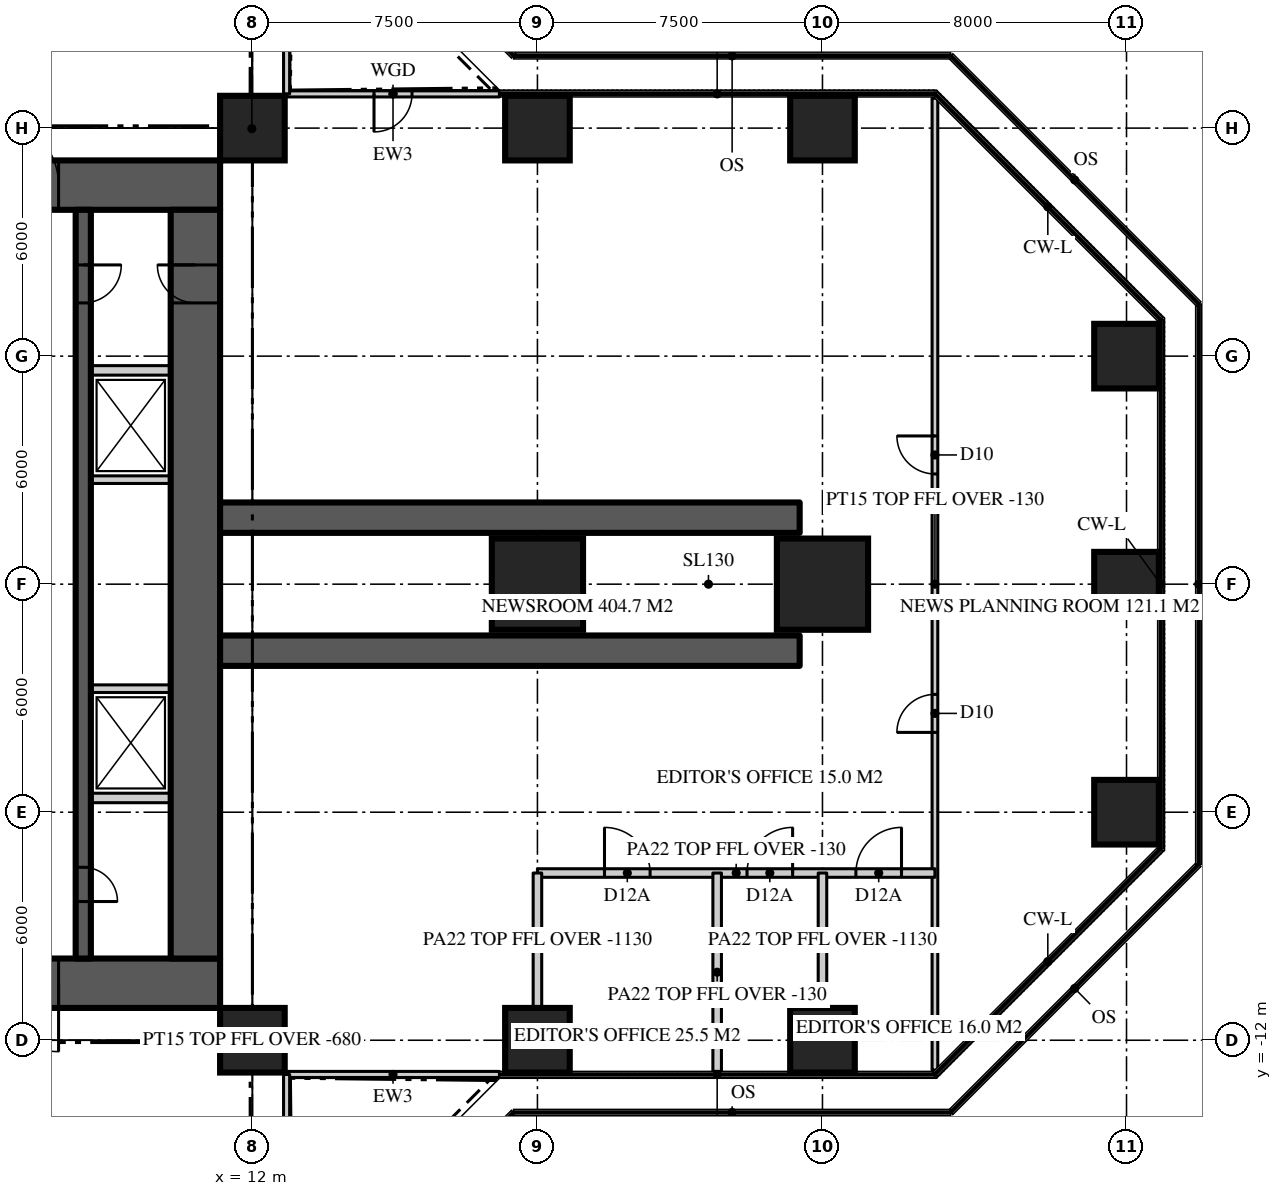
"""IFC4 building model, lengths in metres.
Left out: names, types, materials, properties, quantities, classifications, styles, units other than length and angle.
Written with IfcOpenShell. Run it as: python <this file> out.ifc"""

import sys

from ifc_helpers import new_model, si_unit, direction, frame, frame_2d, origin, origin_2d, place, context, subcontext, project, spatial, rectangle, extrude, element, fill, save


model = new_model("IFC4")
c1 = context("Model", 3, precision=1e-05, world=origin(), true_north=direction((0.0, 1.0)))
c2 = subcontext(c1, "Body", "Model", "MODEL_VIEW")
j1 = project(units=[si_unit("LENGTHUNIT", "METRE"), si_unit("PLANEANGLEUNIT", "RADIAN")], contexts=[c1])
p1 = place(None, origin())
s1 = spatial("IfcSite", under=j1, at=p1, CompositionType="ELEMENT")
p2 = place(p1, origin())
s2 = spatial("IfcBuilding", under=s1, at=p2, CompositionType="ELEMENT")
p3 = place(p2, frame((0.0, 0.0, 47.4)))
s3 = spatial("IfcBuildingStorey", under=s2, at=p3, CompositionType="ELEMENT", Elevation=47.4)
p4 = place(p3, frame((-11.15, 10.5, 0.0), z_axis=(0.0, 0.0, 1.0), x_axis=(1.0, 0.0, 0.0)))
e1 = element("IfcWall", 1, at=p4, inside=s3, PredefinedType="SHEAR", context=c2, shape_type="SweptSolid", body=[
    extrude(rectangle(XDim=22.3, YDim=1.3, at=frame_2d((11.15, 0.0))), origin(), (0.0, 0.0, 1.0), 3.9),
])
p5 = place(p4, frame((4.25, 0.0, 0.0)))
e2 = element("IfcOpeningElement", 2, at=p5, cuts=e1, PredefinedType="OPENING", context=c2, shape_type="SweptSolid", body=[
    extrude(rectangle(XDim=1.8, YDim=2.2, at=frame_2d((0.9, 1.1))), frame((0.0, 0.66, 0.0), z_axis=(0.0, -1.0, 0.0), x_axis=(1.0, 0.0, 0.0)), (0.0, 0.0, 1.0), 1.32),
])
p6 = place(p4, frame((16.25, 0.0, 0.0)))
e3 = element("IfcOpeningElement", 3, at=p6, cuts=e1, PredefinedType="OPENING", context=c2, shape_type="SweptSolid", body=[
    extrude(rectangle(XDim=1.8, YDim=2.2, at=frame_2d((0.9, 1.1))), frame((0.0, 0.66, 0.0), z_axis=(0.0, -1.0, 0.0), x_axis=(1.0, 0.0, 0.0)), (0.0, 0.0, 1.0), 1.32),
])
p7 = place(p3, frame((11.15, -10.5, 0.0), z_axis=(0.0, 0.0, 1.0), x_axis=(-1.0, 0.0, 0.0)))
e4 = element("IfcWall", 4, at=p7, inside=s3, PredefinedType="SHEAR", context=c2, shape_type="SweptSolid", body=[
    extrude(rectangle(XDim=22.3, YDim=1.3, at=frame_2d((11.15, 0.0))), origin(), (0.0, 0.0, 1.0), 3.9),
])
p8 = place(p7, frame((16.25, 0.0, 0.0)))
e5 = element("IfcOpeningElement", 5, at=p8, cuts=e4, PredefinedType="OPENING", context=c2, shape_type="SweptSolid", body=[
    extrude(rectangle(XDim=1.8, YDim=2.2, at=frame_2d((0.9, 1.1))), frame((0.0, 0.66, 0.0), z_axis=(0.0, -1.0, 0.0), x_axis=(1.0, 0.0, 0.0)), (0.0, 0.0, 1.0), 1.32),
])
p9 = place(p7, frame((4.25, 0.0, 0.0)))
e6 = element("IfcOpeningElement", 6, at=p9, cuts=e4, PredefinedType="OPENING", context=c2, shape_type="SweptSolid", body=[
    extrude(rectangle(XDim=1.8, YDim=2.2, at=frame_2d((0.9, 1.1))), frame((0.0, 0.66, 0.0), z_axis=(0.0, -1.0, 0.0), x_axis=(1.0, 0.0, 0.0)), (0.0, 0.0, 1.0), 1.32),
])
p10 = place(p3, frame((10.5, -9.85, 0.0), z_axis=(0.0, 0.0, 1.0), x_axis=(0.0, 1.0, 0.0)))
e7 = element("IfcWall", 7, at=p10, inside=s3, PredefinedType="SHEAR", context=c2, shape_type="SweptSolid", body=[
    extrude(rectangle(XDim=19.7, YDim=1.3, at=frame_2d((9.85, 0.0))), origin(), (0.0, 0.0, 1.0), 3.9),
])
p11 = place(p10, frame((17.25, 0.0, 0.0)))
e8 = element("IfcOpeningElement", 8, at=p11, cuts=e7, PredefinedType="OPENING", context=c2, shape_type="SweptSolid", body=[
    extrude(rectangle(XDim=1.0, YDim=2.2, at=frame_2d((0.5, 1.1))), frame((0.0, 0.66, 0.0), z_axis=(0.0, -1.0, 0.0), x_axis=(1.0, 0.0, 0.0)), (0.0, 0.0, 1.0), 1.32),
])
for number, where, z_axis, x_axis in (
    (9, (11.15, -1.75, 0.0), (0.0, 0.0, 1.0), (1.0, 0.0, 0.0)),
    (10, (11.15, 1.75, 0.0), (0.0, 0.0, 1.0), (1.0, 0.0, 0.0)),
):
    element("IfcWall", number, at=place(p3, frame(where, z_axis=z_axis, x_axis=x_axis)), inside=s3, PredefinedType="SHEAR", context=c2, shape_type="SweptSolid", body=[
        extrude(rectangle(XDim=15.25, YDim=0.8, at=frame_2d((7.625, 0.0))), origin(), (0.0, 0.0, 1.0), 3.9),
    ])
for number, where, z_axis, x_axis in (
    (11, (12.0, -12.0, 0.0), (0.0, 0.0, 1.0), (1.0, 0.0, 0.0)),
    (12, (19.5, -12.0, 0.0), (0.0, 0.0, 1.0), (1.0, 0.0, 0.0)),
    (13, (27.0, -12.0, 0.0), (0.0, 0.0, 1.0), (1.0, 0.0, 0.0)),
    (14, (35.0, -6.0, 0.0), (0.0, 0.0, 1.0), (1.0, 0.0, 0.0)),
):
    element("IfcColumn", number, at=place(p3, frame(where, z_axis=z_axis, x_axis=x_axis)), inside=s3, PredefinedType="COLUMN", context=c2, shape_type="SweptSolid", body=[
        extrude(rectangle(XDim=1.7, YDim=1.7, at=origin_2d()), origin(), (0.0, 0.0, 1.0), 3.9),
    ])
for number, where, z_axis, x_axis in (
    (15, (19.5, 0.0, 0.0), (0.0, 0.0, 1.0), (1.0, 0.0, 0.0)),
    (16, (27.0, 0.0, 0.0), (0.0, 0.0, 1.0), (1.0, 0.0, 0.0)),
):
    element("IfcColumn", number, at=place(p3, frame(where, z_axis=z_axis, x_axis=x_axis)), inside=s3, PredefinedType="COLUMN", context=c2, shape_type="SweptSolid", body=[
        extrude(rectangle(XDim=2.4, YDim=2.4, at=origin_2d()), origin(), (0.0, 0.0, 1.0), 3.9),
    ])
for number, where, z_axis, x_axis in (
    (17, (35.0, 0.0, 0.0), (0.0, 0.0, 1.0), (1.0, 0.0, 0.0)),
    (18, (35.0, 6.0, 0.0), (0.0, 0.0, 1.0), (1.0, 0.0, 0.0)),
    (19, (12.0, 12.0, 0.0), (0.0, 0.0, 1.0), (1.0, 0.0, 0.0)),
    (20, (19.5, 12.0, 0.0), (0.0, 0.0, 1.0), (1.0, 0.0, 0.0)),
    (21, (27.0, 12.0, 0.0), (0.0, 0.0, 1.0), (1.0, 0.0, 0.0)),
):
    element("IfcColumn", number, at=place(p3, frame(where, z_axis=z_axis, x_axis=x_axis)), inside=s3, PredefinedType="COLUMN", context=c2, shape_type="SweptSolid", body=[
        extrude(rectangle(XDim=1.7, YDim=1.7, at=origin_2d()), origin(), (0.0, 0.0, 1.0), 3.9),
    ])
p12 = place(p3, frame((12.9, -12.9, 0.0), z_axis=(0.0, 0.0, 1.0), x_axis=(1.0, 0.0, 0.0)))
e22 = element("IfcWall", 22, at=p12, inside=s3, PredefinedType="SOLIDWALL", context=c2, shape_type="SweptSolid", body=[
    extrude(rectangle(XDim=5.6, YDim=0.16, at=frame_2d((2.8, 0.0))), origin(), (0.0, 0.0, 1.0), 3.77),
])
p13 = place(p3, frame((18.5, 12.9, 0.0), z_axis=(0.0, 0.0, 1.0), x_axis=(-1.0, 0.0, 0.0)))
e23 = element("IfcWall", 23, at=p13, inside=s3, PredefinedType="SOLIDWALL", context=c2, shape_type="SweptSolid", body=[
    extrude(rectangle(XDim=5.6, YDim=0.16, at=frame_2d((2.8, 0.0))), origin(), (0.0, 0.0, 1.0), 3.77),
])
p14 = place(p13, frame((2.3, 0.0, 0.0)))
e24 = element("IfcOpeningElement", 24, at=p14, cuts=e23, PredefinedType="OPENING", context=c2, shape_type="SweptSolid", body=[
    extrude(rectangle(XDim=1.0, YDim=2.2, at=frame_2d((0.5, 1.1))), frame((0.0, 0.09, 0.0), z_axis=(0.0, -1.0, 0.0), x_axis=(1.0, 0.0, 0.0)), (0.0, 0.0, 1.0), 0.18),
])
p15 = place(p3, frame((12.9, 12.9, 0.0), z_axis=(0.0, 0.0, 1.0), x_axis=(0.0, 1.0, 0.0)))
e25 = element("IfcWall", 25, at=p15, inside=s3, PredefinedType="SOLIDWALL", context=c2, shape_type="SweptSolid", body=[
    extrude(rectangle(XDim=5.6, YDim=0.16, at=frame_2d((2.8, 0.0))), origin(), (0.0, 0.0, 1.0), 3.77),
])
p16 = place(p3, frame((12.9, -18.5, 0.0), z_axis=(0.0, 0.0, 1.0), x_axis=(0.0, 1.0, 0.0)))
e26 = element("IfcWall", 26, at=p16, inside=s3, PredefinedType="SOLIDWALL", context=c2, shape_type="SweptSolid", body=[
    extrude(rectangle(XDim=5.6, YDim=0.16, at=frame_2d((2.8, 0.0))), origin(), (0.0, 0.0, 1.0), 3.77),
])
p17 = place(p16, frame((2.3, 0.0, 0.0)))
e27 = element("IfcOpeningElement", 27, at=p17, cuts=e26, PredefinedType="OPENING", context=c2, shape_type="SweptSolid", body=[
    extrude(rectangle(XDim=1.0, YDim=2.2, at=frame_2d((0.5, 1.1))), frame((0.0, 0.09, 0.0), z_axis=(0.0, -1.0, 0.0), x_axis=(1.0, 0.0, 0.0)), (0.0, 0.0, 1.0), 0.18),
])
p18 = place(p3, frame((7.55, 9.85, 0.0), z_axis=(0.0, 0.0, 1.0), x_axis=(0.0, -1.0, 0.0)))
e28 = element("IfcWall", 28, at=p18, inside=s3, PredefinedType="SHEAR", context=c2, shape_type="SweptSolid", body=[
    extrude(rectangle(XDim=19.7, YDim=0.4, at=frame_2d((9.85, 0.0))), origin(), (0.0, 0.0, 1.0), 3.9),
])
p19 = place(p18, frame((1.45, 0.0, 0.0)))
e29 = element("IfcOpeningElement", 29, at=p19, cuts=e28, PredefinedType="OPENING", context=c2, shape_type="SweptSolid", body=[
    extrude(rectangle(XDim=1.0, YDim=2.2, at=frame_2d((0.5, 1.1))), frame((0.0, 0.21, 0.0), z_axis=(0.0, -1.0, 0.0), x_axis=(1.0, 0.0, 0.0)), (0.0, 0.0, 1.0), 0.42),
])
p20 = place(p18, frame((17.3, 0.0, 0.0)))
e30 = element("IfcOpeningElement", 30, at=p20, cuts=e28, PredefinedType="OPENING", context=c2, shape_type="SweptSolid", body=[
    extrude(rectangle(XDim=0.9, YDim=2.1, at=frame_2d((0.45, 1.05))), frame((0.0, 0.21, 0.0), z_axis=(0.0, -1.0, 0.0), x_axis=(1.0, 0.0, 0.0)), (0.0, 0.0, 1.0), 0.42),
])
for number, where, z_axis, x_axis in (
    (31, (7.75, 5.625, 0.0), (0.0, 0.0, 1.0), (1.0, 0.0, 0.0)),
    (32, (7.75, -5.625, 0.0), (0.0, 0.0, 1.0), (1.0, 0.0, 0.0)),
):
    element("IfcWall", number, at=place(p3, frame(where, z_axis=z_axis, x_axis=x_axis)), inside=s3, PredefinedType="SOLIDWALL", context=c2, shape_type="SweptSolid", body=[
        extrude(rectangle(XDim=2.1, YDim=0.25, at=frame_2d((1.05, 0.0))), origin(), (0.0, 0.0, 1.0), 3.7),
    ])
for number, where, z_axis, x_axis in (
    (33, (7.75, -2.75, 0.0), (0.0, 0.0, 1.0), (1.0, 0.0, 0.0)),
    (34, (7.75, 2.75, 0.0), (0.0, 0.0, 1.0), (1.0, 0.0, 0.0)),
):
    element("IfcWall", number, at=place(p3, frame(where, z_axis=z_axis, x_axis=x_axis)), inside=s3, PredefinedType="SOLIDWALL", context=c2, shape_type="SweptSolid", body=[
        extrude(rectangle(XDim=2.1, YDim=0.2, at=frame_2d((1.05, 0.0))), origin(), (0.0, 0.0, 1.0), 3.7),
    ])
p21 = place(p3, frame((29.959, -12.786, 0.0), z_axis=(0.0, 0.0, 1.0), x_axis=(0.0, 1.0, 0.0)))
e35 = element("IfcWall", 35, at=p21, inside=s3, PredefinedType="PARTITIONING", context=c2, shape_type="SweptSolid", body=[
    extrude(rectangle(XDim=25.573, YDim=0.15, at=frame_2d((12.786, 0.0))), origin(), (0.0, 0.0, 1.0), 3.77),
])
p22 = place(p21, frame((15.687, 0.0, 0.0)))
e36 = element("IfcOpeningElement", 36, at=p22, cuts=e35, PredefinedType="OPENING", context=c2, shape_type="SweptSolid", body=[
    extrude(rectangle(XDim=1.0, YDim=2.2, at=frame_2d((0.5, 1.1))), frame((0.0, 0.085, 0.0), z_axis=(0.0, -1.0, 0.0), x_axis=(1.0, 0.0, 0.0)), (0.0, 0.0, 1.0), 0.17),
])
p23 = place(p21, frame((8.886, 0.0, 0.0)))
e37 = element("IfcOpeningElement", 37, at=p23, cuts=e35, PredefinedType="OPENING", context=c2, shape_type="SweptSolid", body=[
    extrude(rectangle(XDim=1.0, YDim=2.2, at=frame_2d((0.5, 1.1))), frame((0.0, 0.085, 0.0), z_axis=(0.0, -1.0, 0.0), x_axis=(1.0, 0.0, 0.0)), (0.0, 0.0, 1.0), 0.17),
])
p24 = place(p3, frame((19.5, -7.6, 0.0), z_axis=(0.0, 0.0, 1.0), x_axis=(1.0, 0.0, 0.0)))
e38 = element("IfcWall", 38, at=p24, inside=s3, PredefinedType="PARTITIONING", context=c2, shape_type="SweptSolid", body=[
    extrude(rectangle(XDim=10.459, YDim=0.225, at=frame_2d((5.229, 0.0))), origin(), (0.0, 0.0, 1.0), 3.77),
])
p25 = place(p24, frame((1.764, 0.0, 0.0)))
e39 = element("IfcOpeningElement", 39, at=p25, cuts=e38, PredefinedType="OPENING", context=c2, shape_type="SweptSolid", body=[
    extrude(rectangle(XDim=1.2, YDim=2.2, at=frame_2d((0.6, 1.1))), frame((0.0, 0.123, 0.0), z_axis=(0.0, -1.0, 0.0), x_axis=(1.0, 0.0, 0.0)), (0.0, 0.0, 1.0), 0.245),
])
p26 = place(p24, frame((5.514, 0.0, 0.0)))
e40 = element("IfcOpeningElement", 40, at=p26, cuts=e38, PredefinedType="OPENING", context=c2, shape_type="SweptSolid", body=[
    extrude(rectangle(XDim=1.2, YDim=2.2, at=frame_2d((0.6, 1.1))), frame((0.0, 0.123, 0.0), z_axis=(0.0, -1.0, 0.0), x_axis=(1.0, 0.0, 0.0)), (0.0, 0.0, 1.0), 0.245),
])
p27 = place(p24, frame((8.379, 0.0, 0.0)))
e41 = element("IfcOpeningElement", 41, at=p27, cuts=e38, PredefinedType="OPENING", context=c2, shape_type="SweptSolid", body=[
    extrude(rectangle(XDim=1.2, YDim=2.2, at=frame_2d((0.6, 1.1))), frame((0.0, 0.123, 0.0), z_axis=(0.0, -1.0, 0.0), x_axis=(1.0, 0.0, 0.0)), (0.0, 0.0, 1.0), 0.245),
])
p28 = place(p3, frame((19.5, -7.6, 0.0), z_axis=(0.0, 0.0, 1.0), x_axis=(0.0, -1.0, 0.0)))
e42 = element("IfcWall", 42, at=p28, inside=s3, PredefinedType="PARTITIONING", context=c2, shape_type="SweptSolid", body=[
    extrude(rectangle(XDim=3.55, YDim=0.225, at=frame_2d((1.775, 0.0))), origin(), (0.0, 0.0, 1.0), 2.77),
])
p29 = place(p3, frame((24.229, -7.6, 0.0), z_axis=(0.0, 0.0, 1.0), x_axis=(0.0, -1.0, 0.0)))
e43 = element("IfcWall", 43, at=p29, inside=s3, PredefinedType="PARTITIONING", context=c2, shape_type="SweptSolid", body=[
    extrude(rectangle(XDim=5.22, YDim=0.225, at=frame_2d((2.61, 0.0))), origin(), (0.0, 0.0, 1.0), 3.77),
])
p30 = place(p3, frame((27.0, -7.6, 0.0), z_axis=(0.0, 0.0, 1.0), x_axis=(0.0, -1.0, 0.0)))
e44 = element("IfcWall", 44, at=p30, inside=s3, PredefinedType="PARTITIONING", context=c2, shape_type="SweptSolid", body=[
    extrude(rectangle(XDim=3.55, YDim=0.225, at=frame_2d((1.775, 0.0))), origin(), (0.0, 0.0, 1.0), 2.77),
])
for number, where, z_axis, x_axis in (
    (45, (11.15, 11.15, 0.0), (0.0, 0.0, 1.0), (0.707, 0.707, 0.0)),
    (46, (11.15, -11.15, 0.0), (0.0, 0.0, 1.0), (0.707, -0.707, 0.0)),
):
    element("IfcWall", number, at=place(p3, frame(where, z_axis=z_axis, x_axis=x_axis)), inside=s3, PredefinedType="PARTITIONING", context=c2, shape_type="SweptSolid", body=[
        extrude(rectangle(XDim=2.362, YDim=0.15, at=frame_2d((1.181, 0.0))), origin(), (0.0, 0.0, 1.0), 3.22),
    ])
p31 = place(p14, origin())
e47 = element("IfcDoor", 47, at=p31, inside=s3, OperationType="SINGLE_SWING_RIGHT", PredefinedType="DOOR", context=c2, shape_type="SweptSolid", body=[
    extrude(rectangle(XDim=1.0, YDim=2.2, at=frame_2d((0.5, 1.1))), frame((0.0, 0.025, 0.0), z_axis=(0.0, -1.0, 0.0), x_axis=(1.0, 0.0, 0.0)), (0.0, 0.0, 1.0), 0.05),
])
fill(e24, e47)
p32 = place(p6, origin())
e48 = element("IfcDoor", 48, at=p32, inside=s3, OperationType="DOUBLE_DOOR_DOUBLE_SWING", PredefinedType="DOOR", context=c2, shape_type="SweptSolid", body=[
    extrude(rectangle(XDim=1.8, YDim=2.2, at=frame_2d((0.9, 1.1))), frame((0.0, 0.025, 0.0), z_axis=(0.0, -1.0, 0.0), x_axis=(1.0, 0.0, 0.0)), (0.0, 0.0, 1.0), 0.05),
])
fill(e3, e48)
p33 = place(p9, origin())
e49 = element("IfcDoor", 49, at=p33, inside=s3, OperationType="DOUBLE_DOOR_DOUBLE_SWING", PredefinedType="DOOR", context=c2, shape_type="SweptSolid", body=[
    extrude(rectangle(XDim=1.8, YDim=2.2, at=frame_2d((0.9, 1.1))), frame((0.0, 0.025, 0.0), z_axis=(0.0, -1.0, 0.0), x_axis=(1.0, 0.0, 0.0)), (0.0, 0.0, 1.0), 0.05),
])
fill(e6, e49)
p34 = place(p19, origin())
e50 = element("IfcDoor", 50, at=p34, inside=s3, OperationType="SINGLE_SWING_LEFT", PredefinedType="DOOR", context=c2, shape_type="SweptSolid", body=[
    extrude(rectangle(XDim=1.0, YDim=2.2, at=frame_2d((0.5, 1.1))), frame((0.0, 0.025, 0.0), z_axis=(0.0, -1.0, 0.0), x_axis=(1.0, 0.0, 0.0)), (0.0, 0.0, 1.0), 0.05),
])
fill(e29, e50)
p35 = place(p11, origin())
e51 = element("IfcDoor", 51, at=p35, inside=s3, OperationType="SINGLE_SWING_RIGHT", PredefinedType="DOOR", context=c2, shape_type="SweptSolid", body=[
    extrude(rectangle(XDim=1.0, YDim=2.2, at=frame_2d((0.5, 1.1))), frame((0.0, 0.025, 0.0), z_axis=(0.0, -1.0, 0.0), x_axis=(1.0, 0.0, 0.0)), (0.0, 0.0, 1.0), 0.05),
])
fill(e8, e51)
p36 = place(p20, origin())
e52 = element("IfcDoor", 52, at=p36, inside=s3, OperationType="SINGLE_SWING_RIGHT", PredefinedType="DOOR", context=c2, shape_type="SweptSolid", body=[
    extrude(rectangle(XDim=0.9, YDim=2.1, at=frame_2d((0.45, 1.05))), frame((0.0, 0.025, 0.0), z_axis=(0.0, -1.0, 0.0), x_axis=(1.0, 0.0, 0.0)), (0.0, 0.0, 1.0), 0.05),
])
fill(e30, e52)
p37 = place(p22, origin())
e53 = element("IfcDoor", 53, at=p37, inside=s3, OperationType="SINGLE_SWING_RIGHT", PredefinedType="DOOR", context=c2, shape_type="SweptSolid", body=[
    extrude(rectangle(XDim=1.0, YDim=2.2, at=frame_2d((0.5, 1.1))), frame((0.0, 0.025, 0.0), z_axis=(0.0, -1.0, 0.0), x_axis=(1.0, 0.0, 0.0)), (0.0, 0.0, 1.0), 0.05),
])
fill(e36, e53)
p38 = place(p23, origin())
e54 = element("IfcDoor", 54, at=p38, inside=s3, OperationType="SINGLE_SWING_LEFT", PredefinedType="DOOR", context=c2, shape_type="SweptSolid", body=[
    extrude(rectangle(XDim=1.0, YDim=2.2, at=frame_2d((0.5, 1.1))), frame((0.0, 0.025, 0.0), z_axis=(0.0, -1.0, 0.0), x_axis=(1.0, 0.0, 0.0)), (0.0, 0.0, 1.0), 0.05),
])
fill(e37, e54)
p39 = place(p25, origin())
e55 = element("IfcDoor", 55, at=p39, inside=s3, OperationType="SINGLE_SWING_LEFT", PredefinedType="DOOR", context=c2, shape_type="SweptSolid", body=[
    extrude(rectangle(XDim=1.2, YDim=2.2, at=frame_2d((0.6, 1.1))), frame((0.0, 0.025, 0.0), z_axis=(0.0, -1.0, 0.0), x_axis=(1.0, 0.0, 0.0)), (0.0, 0.0, 1.0), 0.05),
])
fill(e39, e55)
p40 = place(p26, origin())
e56 = element("IfcDoor", 56, at=p40, inside=s3, OperationType="SINGLE_SWING_RIGHT", PredefinedType="DOOR", context=c2, shape_type="SweptSolid", body=[
    extrude(rectangle(XDim=1.2, YDim=2.2, at=frame_2d((0.6, 1.1))), frame((0.0, 0.025, 0.0), z_axis=(0.0, -1.0, 0.0), x_axis=(1.0, 0.0, 0.0)), (0.0, 0.0, 1.0), 0.05),
])
fill(e40, e56)
p41 = place(p27, origin())
e57 = element("IfcDoor", 57, at=p41, inside=s3, OperationType="SINGLE_SWING_RIGHT", PredefinedType="DOOR", context=c2, shape_type="SweptSolid", body=[
    extrude(rectangle(XDim=1.2, YDim=2.2, at=frame_2d((0.6, 1.1))), frame((0.0, 0.025, 0.0), z_axis=(0.0, -1.0, 0.0), x_axis=(1.0, 0.0, 0.0)), (0.0, 0.0, 1.0), 0.05),
])
fill(e41, e57)
save(model, sys.argv[1])
